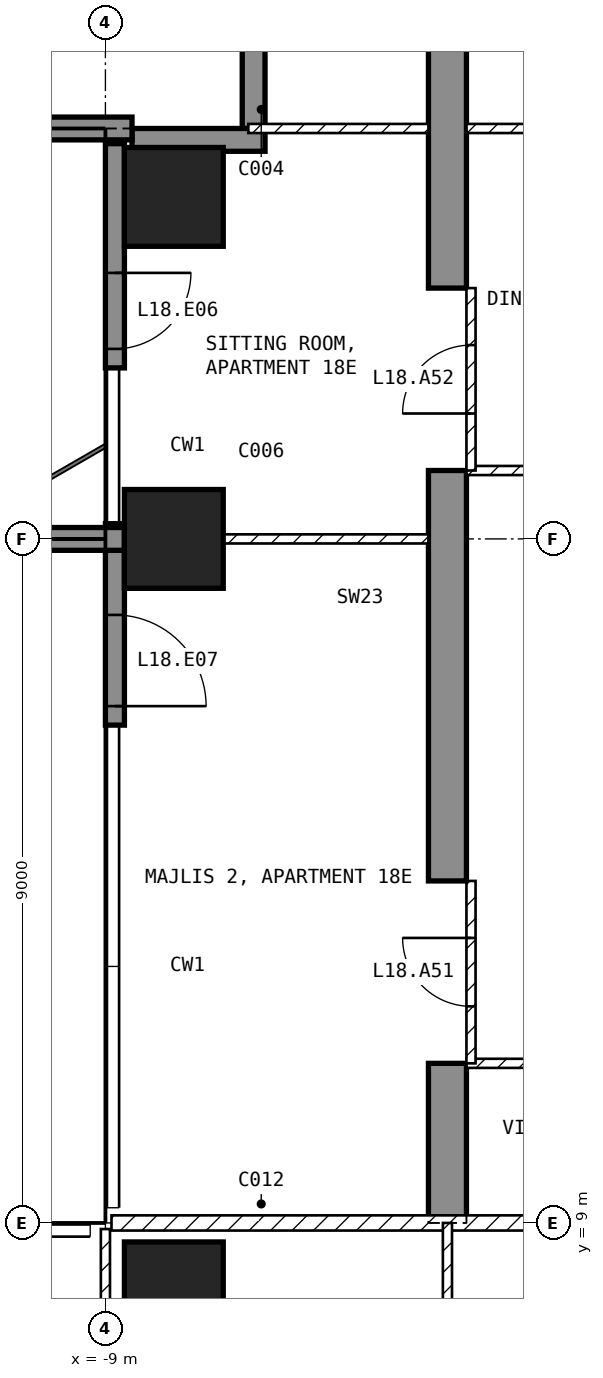
"""IFC4 building model, lengths in metres.
Left out: names, types, materials, properties, quantities, classifications, styles, units other than length and angle.
Written with IfcOpenShell. Run it as: python <this file> out.ifc"""

import sys

from ifc_helpers import new_model, si_unit, direction, frame, frame_2d, origin, origin_2d, place, context, subcontext, project, spatial, polyline, rectangle, outline, extrude, element, fill, save


model = new_model("IFC4")
c1 = context("Model", 3, precision=1e-05, world=origin(), true_north=direction((0.0, 1.0)))
c2 = subcontext(c1, "Body", "Model", "MODEL_VIEW")
j1 = project(units=[si_unit("LENGTHUNIT", "METRE"), si_unit("PLANEANGLEUNIT", "RADIAN")], contexts=[c1])
p1 = place(None, origin())
s1 = spatial("IfcSite", under=j1, at=p1, CompositionType="ELEMENT")
p2 = place(p1, origin())
s2 = spatial("IfcBuilding", under=s1, at=p2, CompositionType="ELEMENT")
p3 = place(p2, frame((0.0, 0.0, 82.0)))
s3 = spatial("IfcBuildingStorey", under=s2, at=p3, CompositionType="ELEMENT", Elevation=82.0)
for number, where, z_axis, x_axis in (
    (1, (-8.1, 8.1, -0.25), (0.0, 0.0, 1.0), (1.0, 0.0, 0.0)),
    (2, (-8.1, 18.0, -0.25), (0.0, 0.0, 1.0), (1.0, 0.0, 0.0)),
    (3, (-8.1, 22.5, -0.25), (0.0, 0.0, 1.0), (1.0, 0.0, 0.0)),
):
    element("IfcColumn", number, at=place(p3, frame(where, z_axis=z_axis, x_axis=x_axis)), inside=s3, PredefinedType="COLUMN", context=c2, shape_type="SweptSolid", body=[
        extrude(rectangle(XDim=1.3, YDim=1.3, at=origin_2d()), origin(), (0.0, 0.0, 1.0), 3.5),
    ])
p4 = place(p3, frame((-4.75, 9.0, -0.25), z_axis=(1.0, 0.0, 0.0), x_axis=(0.0, 1.0, 0.0)))
e4 = element("IfcWall", 4, at=p4, inside=s3, PredefinedType="SHEAR", context=c2, shape_type="SweptSolid", body=[
    extrude(outline(polyline([(0.0, 0.0), (2.1, 0.0), (2.1, 2.65), (4.5, 2.65), (4.5, 0.0), (9.9, 0.0), (9.9, 2.65), (12.3, 2.65), (12.3, 0.0), (16.45, 0.0), (16.45, 3.5), (0.0, 3.5), (0.0, 0.0)])), origin(), (0.0, 0.0, 1.0), 0.5),
])
p5 = place(p3, frame((-8.875, 23.2, 0.0), z_axis=(0.0, 0.0, 1.0), x_axis=(0.0, -1.0, 0.0)))
e5 = element("IfcWall", 5, at=p5, inside=s3, PredefinedType="SOLIDWALL", context=c2, shape_type="SweptSolid", body=[
    extrude(rectangle(XDim=2.95, YDim=0.25, at=frame_2d((1.475, 0.0))), origin(), (0.0, 0.0, 1.0), 3.25),
])
p6 = place(p5, frame((1.7, 0.0, 0.0)))
e6 = element("IfcOpeningElement", 6, at=p6, cuts=e5, PredefinedType="OPENING", context=c2, shape_type="SweptSolid", body=[
    extrude(rectangle(XDim=1.0, YDim=2.4, at=frame_2d((0.5, 1.2))), frame((0.0, 0.135, 0.0), z_axis=(0.0, -1.0, 0.0), x_axis=(1.0, 0.0, 0.0)), (0.0, 0.0, 1.0), 0.27),
])
p7 = place(p3, frame((-8.875, 18.2, 0.0), z_axis=(0.0, 0.0, 1.0), x_axis=(0.0, -1.0, 0.0)))
e7 = element("IfcWall", 7, at=p7, inside=s3, PredefinedType="SOLIDWALL", context=c2, shape_type="SweptSolid", body=[
    extrude(rectangle(XDim=2.65, YDim=0.25, at=frame_2d((1.325, 0.0))), origin(), (0.0, 0.0, 1.0), 3.25),
])
p8 = place(p7, frame((1.2, 0.0, 0.0)))
e8 = element("IfcOpeningElement", 8, at=p8, cuts=e7, PredefinedType="OPENING", context=c2, shape_type="SweptSolid", body=[
    extrude(rectangle(XDim=1.2, YDim=2.4, at=frame_2d((0.6, 1.2))), frame((0.0, 0.135, 0.0), z_axis=(0.0, -1.0, 0.0), x_axis=(1.0, 0.0, 0.0)), (0.0, 0.0, 1.0), 0.27),
])
p9 = place(p3, frame((-7.05, 25.2, 0.0), z_axis=(0.0, 0.0, 1.0), x_axis=(0.0, -1.0, 0.0)))
e9 = element("IfcWall", 9, at=p9, inside=s3, PredefinedType="SOLIDWALL", context=c2, shape_type="SweptSolid", body=[
    extrude(rectangle(XDim=1.8, YDim=0.3, at=frame_2d((0.9, 0.0))), origin(), (0.0, 0.0, 1.0), 3.25),
])
p10 = place(p3, frame((-6.9, 23.25, 0.0), z_axis=(0.0, 0.0, 1.0), x_axis=(-1.0, 0.0, 0.0)))
e10 = element("IfcWall", 10, at=p10, inside=s3, PredefinedType="SOLIDWALL", context=c2, shape_type="SweptSolid", body=[
    extrude(rectangle(XDim=1.75, YDim=0.3, at=frame_2d((0.875, 0.0))), origin(), (0.0, 0.0, 1.0), 3.25),
])
p11 = place(p3, frame((-8.75, 18.0, 0.0), z_axis=(0.0, 0.0, 1.0), x_axis=(-1.0, 0.0, 0.0)))
e11 = element("IfcWall", 11, at=p11, inside=s3, PredefinedType="SOLIDWALL", context=c2, shape_type="SweptSolid", body=[
    extrude(rectangle(XDim=2.95, YDim=0.3, at=frame_2d((1.475, 0.0))), origin(), (0.0, 0.0, 1.0), 3.25),
])
p12 = place(p3, frame((-8.65, 23.4, 0.0), z_axis=(0.0, 0.0, 1.0), x_axis=(-1.0, 0.0, 0.0)))
e12 = element("IfcWall", 12, at=p12, inside=s3, PredefinedType="SOLIDWALL", context=c2, shape_type="SweptSolid", body=[
    extrude(rectangle(XDim=3.05, YDim=0.3, at=frame_2d((1.525, 0.0))), origin(), (0.0, 0.0, 1.0), 3.25),
])
p13 = place(p3, frame((-8.92, 9.0, 0.0), z_axis=(0.0, 0.0, 1.0), x_axis=(1.0, 0.0, 0.0)))
e13 = element("IfcWall", 13, at=p13, inside=s3, PredefinedType="PARTITIONING", context=c2, shape_type="SweptSolid", body=[
    extrude(rectangle(XDim=17.84, YDim=0.2, at=frame_2d((8.92, 0.0))), origin(), (0.0, 0.0, 1.0), 3.25),
])
p14 = place(p13, frame((8.42, 0.0, 0.0)))
e14 = element("IfcOpeningElement", 14, at=p14, cuts=e13, PredefinedType="OPENING", context=c2, shape_type="SweptSolid", body=[
    extrude(rectangle(XDim=1.0, YDim=2.1, at=frame_2d((0.5, 1.05))), frame((0.0, 0.11, 0.0), z_axis=(0.0, -1.0, 0.0), x_axis=(1.0, 0.0, 0.0)), (0.0, 0.0, 1.0), 0.22),
])
p15 = place(p3, frame((-9.0, 8.92, 0.0), z_axis=(0.0, 0.0, 1.0), x_axis=(0.0, -1.0, 0.0)))
e15 = element("IfcWall", 15, at=p15, inside=s3, PredefinedType="PARTITIONING", context=c2, shape_type="SweptSolid", body=[
    extrude(rectangle(XDim=7.62, YDim=0.12, at=frame_2d((3.81, 0.0))), origin(), (0.0, 0.0, 1.0), 3.25),
])
p16 = place(p15, frame((2.67, 0.0, 0.0)))
e16 = element("IfcOpeningElement", 16, at=p16, cuts=e15, PredefinedType="OPENING", context=c2, shape_type="SweptSolid", body=[
    extrude(rectangle(XDim=0.9, YDim=2.1, at=frame_2d((0.45, 1.05))), frame((0.0, 0.07, 0.0), z_axis=(0.0, -1.0, 0.0), x_axis=(1.0, 0.0, 0.0)), (0.0, 0.0, 1.0), 0.14),
])
p17 = place(p3, frame((-4.5, 9.0, 0.0), z_axis=(0.0, 0.0, 1.0), x_axis=(0.0, -1.0, 0.0)))
e17 = element("IfcWall", 17, at=p17, inside=s3, PredefinedType="PARTITIONING", context=c2, shape_type="SweptSolid", body=[
    extrude(rectangle(XDim=7.7, YDim=0.12, at=frame_2d((3.85, 0.0))), origin(), (0.0, 0.0, 1.0), 3.25),
])
p18 = place(p17, frame((3.4, 0.0, 0.0)))
e18 = element("IfcOpeningElement", 18, at=p18, cuts=e17, PredefinedType="OPENING", context=c2, shape_type="SweptSolid", body=[
    extrude(rectangle(XDim=0.9, YDim=2.1, at=frame_2d((0.45, 1.05))), frame((0.0, 0.07, 0.0), z_axis=(0.0, -1.0, 0.0), x_axis=(1.0, 0.0, 0.0)), (0.0, 0.0, 1.0), 0.14),
])
p19 = place(p3, frame((-4.25, 11.1, 0.0), z_axis=(0.0, 0.0, 1.0), x_axis=(1.0, 0.0, 0.0)))
e19 = element("IfcWall", 19, at=p19, inside=s3, PredefinedType="PARTITIONING", context=c2, shape_type="SweptSolid", body=[
    extrude(rectangle(XDim=6.35, YDim=0.12, at=frame_2d((3.175, 0.0))), origin(), (0.0, 0.0, 1.0), 3.25),
])
p20 = place(p19, frame((2.725, 0.0, 0.0)))
e20 = element("IfcOpeningElement", 20, at=p20, cuts=e19, PredefinedType="OPENING", context=c2, shape_type="SweptSolid", body=[
    extrude(rectangle(XDim=0.9, YDim=2.1, at=frame_2d((0.45, 1.05))), frame((0.0, 0.07, 0.0), z_axis=(0.0, -1.0, 0.0), x_axis=(1.0, 0.0, 0.0)), (0.0, 0.0, 1.0), 0.14),
])
p21 = place(p3, frame((-4.25, 18.9, 0.0), z_axis=(0.0, 0.0, 1.0), x_axis=(1.0, 0.0, 0.0)))
e21 = element("IfcWall", 21, at=p21, inside=s3, PredefinedType="PARTITIONING", context=c2, shape_type="SweptSolid", body=[
    extrude(rectangle(XDim=8.5, YDim=0.12, at=frame_2d((4.25, 0.0))), origin(), (0.0, 0.0, 1.0), 3.25),
])
p22 = place(p21, frame((1.925, 0.0, 0.0)))
e22 = element("IfcOpeningElement", 22, at=p22, cuts=e21, PredefinedType="OPENING", context=c2, shape_type="SweptSolid", body=[
    extrude(rectangle(XDim=0.9, YDim=2.1, at=frame_2d((0.45, 1.05))), frame((0.0, 0.07, 0.0), z_axis=(0.0, -1.0, 0.0), x_axis=(1.0, 0.0, 0.0)), (0.0, 0.0, 1.0), 0.14),
])
p23 = place(p3, frame((-4.25, 23.4, 0.0), z_axis=(0.0, 0.0, 1.0), x_axis=(1.0, 0.0, 0.0)))
e23 = element("IfcWall", 23, at=p23, inside=s3, PredefinedType="PARTITIONING", context=c2, shape_type="SweptSolid", body=[
    extrude(rectangle(XDim=8.5, YDim=0.12, at=frame_2d((4.25, 0.0))), origin(), (0.0, 0.0, 1.0), 3.25),
])
p24 = place(p23, frame((1.925, 0.0, 0.0)))
e24 = element("IfcOpeningElement", 24, at=p24, cuts=e23, PredefinedType="OPENING", context=c2, shape_type="SweptSolid", body=[
    extrude(rectangle(XDim=0.9, YDim=2.1, at=frame_2d((0.45, 1.05))), frame((0.0, 0.07, 0.0), z_axis=(0.0, -1.0, 0.0), x_axis=(1.0, 0.0, 0.0)), (0.0, 0.0, 1.0), 0.14),
])
p25 = place(p3, frame((-7.45, 18.0, 0.0), z_axis=(0.0, 0.0, 1.0), x_axis=(1.0, 0.0, 0.0)))
e25 = element("IfcWall", 25, at=p25, inside=s3, PredefinedType="PARTITIONING", context=c2, shape_type="SweptSolid", body=[
    extrude(rectangle(XDim=2.7, YDim=0.12, at=frame_2d((1.35, 0.0))), origin(), (0.0, 0.0, 1.0), 2.346),
])
p26 = place(p3, frame((-7.12, 23.4, 0.0), z_axis=(0.0, 0.0, 1.0), x_axis=(1.0, 0.0, 0.0)))
e26 = element("IfcWall", 26, at=p26, inside=s3, PredefinedType="PARTITIONING", context=c2, shape_type="SweptSolid", body=[
    extrude(rectangle(XDim=2.37, YDim=0.12, at=frame_2d((1.185, 0.0))), origin(), (0.0, 0.0, 1.0), 3.25),
])
p27 = place(p3, frame((-4.19, 11.1, 0.0), z_axis=(0.0, 0.0, 1.0), x_axis=(0.0, 1.0, 0.0)))
e27 = element("IfcWall", 27, at=p27, inside=s3, PredefinedType="PARTITIONING", context=c2, shape_type="SweptSolid", body=[
    extrude(rectangle(XDim=2.4, YDim=0.12, at=frame_2d((1.2, 0.0))), origin(), (0.0, 0.0, 1.0), 2.4),
])
p28 = place(p27, frame((0.75, 0.0, 0.0)))
e28 = element("IfcOpeningElement", 28, at=p28, cuts=e27, PredefinedType="OPENING", context=c2, shape_type="SweptSolid", body=[
    extrude(rectangle(XDim=0.9, YDim=2.1, at=frame_2d((0.45, 1.05))), frame((0.0, 0.07, 0.0), z_axis=(0.0, -1.0, 0.0), x_axis=(1.0, 0.0, 0.0)), (0.0, 0.0, 1.0), 0.14),
])
p29 = place(p3, frame((-4.19, 18.9, 0.0), z_axis=(0.0, 0.0, 1.0), x_axis=(0.0, 1.0, 0.0)))
e29 = element("IfcWall", 29, at=p29, inside=s3, PredefinedType="PARTITIONING", context=c2, shape_type="SweptSolid", body=[
    extrude(rectangle(XDim=2.4, YDim=0.12, at=frame_2d((1.2, 0.0))), origin(), (0.0, 0.0, 1.0), 2.4),
])
p30 = place(p29, frame((0.75, 0.0, 0.0)))
e30 = element("IfcOpeningElement", 30, at=p30, cuts=e29, PredefinedType="OPENING", context=c2, shape_type="SweptSolid", body=[
    extrude(rectangle(XDim=0.9, YDim=2.1, at=frame_2d((0.45, 1.05))), frame((0.0, 0.07, 0.0), z_axis=(0.0, -1.0, 0.0), x_axis=(1.0, 0.0, 0.0)), (0.0, 0.0, 1.0), 0.14),
])
p31 = place(p6, origin())
e31 = element("IfcDoor", 31, at=p31, inside=s3, OperationType="SINGLE_SWING_LEFT", PredefinedType="DOOR", context=c2, shape_type="SweptSolid", body=[
    extrude(rectangle(XDim=1.0, YDim=2.4, at=frame_2d((0.5, 1.2))), frame((0.0, 0.025, 0.0), z_axis=(0.0, -1.0, 0.0), x_axis=(1.0, 0.0, 0.0)), (0.0, 0.0, 1.0), 0.05),
])
fill(e6, e31)
p32 = place(p8, origin())
e32 = element("IfcDoor", 32, at=p32, inside=s3, OperationType="SINGLE_SWING_RIGHT", PredefinedType="DOOR", context=c2, shape_type="SweptSolid", body=[
    extrude(rectangle(XDim=1.2, YDim=2.4, at=frame_2d((0.6, 1.2))), frame((0.0, 0.025, 0.0), z_axis=(0.0, -1.0, 0.0), x_axis=(1.0, 0.0, 0.0)), (0.0, 0.0, 1.0), 0.05),
])
fill(e8, e32)
p33 = place(p28, origin())
e33 = element("IfcDoor", 33, at=p33, inside=s3, OperationType="SINGLE_SWING_RIGHT", PredefinedType="DOOR", context=c2, shape_type="SweptSolid", body=[
    extrude(rectangle(XDim=0.9, YDim=2.1, at=frame_2d((0.45, 1.05))), frame((0.0, 0.025, 0.0), z_axis=(0.0, -1.0, 0.0), x_axis=(1.0, 0.0, 0.0)), (0.0, 0.0, 1.0), 0.05),
])
fill(e28, e33)
p34 = place(p30, origin())
e34 = element("IfcDoor", 34, at=p34, inside=s3, OperationType="SINGLE_SWING_LEFT", PredefinedType="DOOR", context=c2, shape_type="SweptSolid", body=[
    extrude(rectangle(XDim=0.9, YDim=2.1, at=frame_2d((0.45, 1.05))), frame((0.0, 0.025, 0.0), z_axis=(0.0, -1.0, 0.0), x_axis=(1.0, 0.0, 0.0)), (0.0, 0.0, 1.0), 0.05),
])
fill(e30, e34)
save(model, sys.argv[1])
